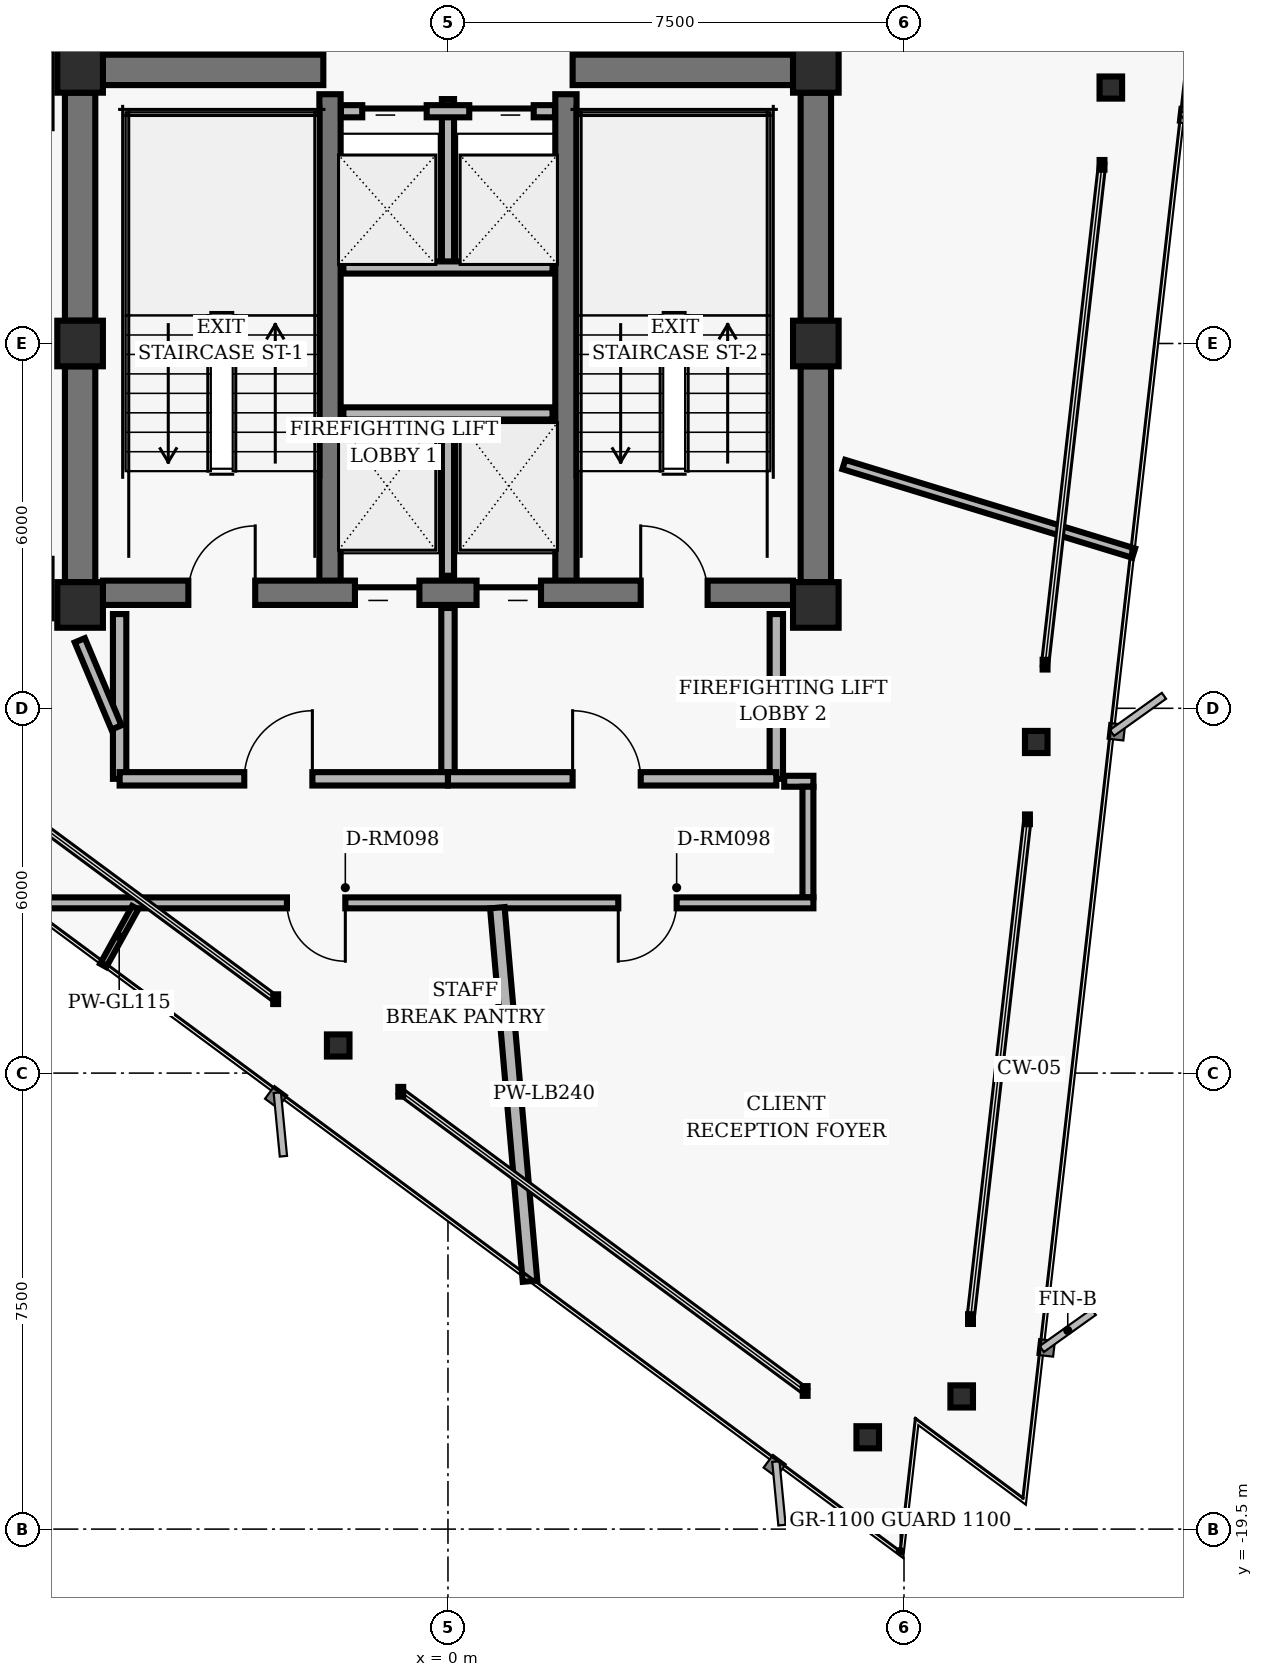
"""IFC4 building model, lengths in metres.
Left out: names, types, materials, properties, quantities, classifications, styles, units other than length and angle.
Written with IfcOpenShell. Run it as: python <this file> out.ifc"""

import sys

from ifc_helpers import new_model, si_unit, direction, frame, frame_2d, origin, origin_2d, place, context, subcontext, project, spatial, rectangle, hollow_rectangle, i_section, extrude, element, fill, save


model = new_model("IFC4")
c1 = context("Model", 3, precision=1e-05, world=origin(), true_north=direction((0.0, 1.0)))
c2 = subcontext(c1, "Body", "Model", "MODEL_VIEW")
j1 = project(units=[si_unit("LENGTHUNIT", "METRE"), si_unit("PLANEANGLEUNIT", "RADIAN")], contexts=[c1])
p1 = place(None, origin())
s1 = spatial("IfcSite", under=j1, at=p1, CompositionType="ELEMENT")
p2 = place(p1, origin())
s2 = spatial("IfcBuilding", under=s1, at=p2, CompositionType="ELEMENT")
p3 = place(p2, frame((0.0, 0.0, 230.08)))
s3 = spatial("IfcBuildingStorey", under=s2, at=p3, CompositionType="ELEMENT", Elevation=230.08)
for number, where, z_axis, x_axis in (
    (1, (-6.05, 4.5, 0.0), (0.0, 0.0, 1.0), (1.0, 0.0, 0.0)),
    (2, (6.05, 4.5, 0.0), (0.0, 0.0, 1.0), (1.0, 0.0, 0.0)),
    (3, (-6.05, 0.0, 0.0), (0.0, 0.0, 1.0), (1.0, 0.0, 0.0)),
    (4, (6.05, 0.0, 0.0), (0.0, 0.0, 1.0), (1.0, 0.0, 0.0)),
    (5, (-6.05, -4.3, 0.0), (0.0, 0.0, 1.0), (1.0, 0.0, 0.0)),
    (6, (6.05, -4.3, 0.0), (0.0, 0.0, 1.0), (1.0, 0.0, 0.0)),
):
    element("IfcColumn", number, at=place(p3, frame(where, z_axis=z_axis, x_axis=x_axis)), inside=s3, PredefinedType="COLUMN", context=c2, shape_type="SweptSolid", body=[
        extrude(hollow_rectangle(XDim=0.75, YDim=0.75, WallThickness=0.05, InnerFilletRadius=0.02, OuterFilletRadius=0.04, at=origin_2d()), origin(), (0.0, 0.0, 1.0), 3.04),
    ])
p4 = place(p3, frame((-6.05, 0.375, 0.0), z_axis=(0.0, 0.0, 1.0), x_axis=(0.0, 1.0, 0.0)))
e7 = element("IfcWall", 7, at=p4, inside=s3, PredefinedType="SHEAR", context=c2, shape_type="SweptSolid", body=[
    extrude(rectangle(XDim=3.75, YDim=0.5, at=frame_2d((1.875, 0.0))), origin(), (0.0, 0.0, 1.0), 2.798),
])
p5 = place(p3, frame((-6.05, -3.925, 0.0), z_axis=(0.0, 0.0, 1.0), x_axis=(0.0, 1.0, 0.0)))
e8 = element("IfcWall", 8, at=p5, inside=s3, PredefinedType="SHEAR", context=c2, shape_type="SweptSolid", body=[
    extrude(rectangle(XDim=3.55, YDim=0.5, at=frame_2d((1.775, 0.0))), origin(), (0.0, 0.0, 1.0), 2.798),
])
p6 = place(p3, frame((6.05, 0.375, 0.0), z_axis=(0.0, 0.0, 1.0), x_axis=(0.0, 1.0, 0.0)))
e9 = element("IfcWall", 9, at=p6, inside=s3, PredefinedType="SHEAR", context=c2, shape_type="SweptSolid", body=[
    extrude(rectangle(XDim=3.75, YDim=0.5, at=frame_2d((1.875, 0.0))), origin(), (0.0, 0.0, 1.0), 2.798),
])
p7 = place(p3, frame((6.05, -3.925, 0.0), z_axis=(0.0, 0.0, 1.0), x_axis=(0.0, 1.0, 0.0)))
e10 = element("IfcWall", 10, at=p7, inside=s3, PredefinedType="SHEAR", context=c2, shape_type="SweptSolid", body=[
    extrude(rectangle(XDim=3.55, YDim=0.5, at=frame_2d((1.775, 0.0))), origin(), (0.0, 0.0, 1.0), 2.798),
])
for number, where, z_axis, x_axis in (
    (11, (-1.94, -4.1, 0.0), (0.0, 0.0, 1.0), (0.0, 1.0, 0.0)),
    (12, (1.94, -4.1, 0.0), (0.0, 0.0, 1.0), (0.0, 1.0, 0.0)),
):
    element("IfcWall", number, at=place(p3, frame(where, z_axis=z_axis, x_axis=x_axis)), inside=s3, PredefinedType="SHEAR", context=c2, shape_type="SweptSolid", body=[
        extrude(rectangle(XDim=8.2, YDim=0.35, at=frame_2d((4.1, 0.0))), origin(), (0.0, 0.0, 1.0), 2.798),
    ])
p8 = place(p3, frame((-5.675, -4.1, 0.0), z_axis=(0.0, 0.0, 1.0), x_axis=(1.0, 0.0, 0.0)))
e13 = element("IfcWall", 13, at=p8, inside=s3, PredefinedType="SHEAR", context=c2, shape_type="SweptSolid", body=[
    extrude(rectangle(XDim=11.35, YDim=0.4, at=frame_2d((5.675, 0.0))), origin(), (0.0, 0.0, 1.0), 2.798),
])
p9 = place(p8, frame((1.405, 0.0, 0.0)))
e14 = element("IfcOpeningElement", 14, at=p9, cuts=e13, PredefinedType="OPENING", context=c2, shape_type="SweptSolid", body=[
    extrude(rectangle(XDim=1.1, YDim=2.04, at=frame_2d((0.55, 1.02))), frame((0.0, 0.21, 0.0), z_axis=(0.0, -1.0, 0.0), x_axis=(1.0, 0.0, 0.0)), (0.0, 0.0, 1.0), 0.42),
])
p10 = place(p8, frame((8.845, 0.0, 0.0)))
e15 = element("IfcOpeningElement", 15, at=p10, cuts=e13, PredefinedType="OPENING", context=c2, shape_type="SweptSolid", body=[
    extrude(rectangle(XDim=1.1, YDim=2.04, at=frame_2d((0.55, 1.02))), frame((0.0, 0.21, 0.0), z_axis=(0.0, -1.0, 0.0), x_axis=(1.0, 0.0, 0.0)), (0.0, 0.0, 1.0), 0.42),
])
p11 = place(p8, frame((4.145, 0.0, 0.0)))
e16 = element("IfcOpeningElement", 16, at=p11, cuts=e13, PredefinedType="OPENING", context=c2, shape_type="SweptSolid", body=[
    extrude(rectangle(XDim=1.06, YDim=2.04, at=frame_2d((0.53, 1.02))), frame((0.0, 0.21, 0.0), z_axis=(0.0, -1.0, 0.0), x_axis=(1.0, 0.0, 0.0)), (0.0, 0.0, 1.0), 0.42),
])
p12 = place(p8, frame((6.145, 0.0, 0.0)))
e17 = element("IfcOpeningElement", 17, at=p12, cuts=e13, PredefinedType="OPENING", context=c2, shape_type="SweptSolid", body=[
    extrude(rectangle(XDim=1.06, YDim=2.04, at=frame_2d((0.53, 1.02))), frame((0.0, 0.21, 0.0), z_axis=(0.0, -1.0, 0.0), x_axis=(1.0, 0.0, 0.0)), (0.0, 0.0, 1.0), 0.42),
])
for number, where, z_axis, x_axis in (
    (18, (-5.675, 4.5, 0.0), (0.0, 0.0, 1.0), (1.0, 0.0, 0.0)),
    (19, (2.05, 4.5, 0.0), (0.0, 0.0, 1.0), (1.0, 0.0, 0.0)),
):
    element("IfcWall", number, at=place(p3, frame(where, z_axis=z_axis, x_axis=x_axis)), inside=s3, PredefinedType="SHEAR", context=c2, shape_type="SweptSolid", body=[
        extrude(rectangle(XDim=3.625, YDim=0.5, at=frame_2d((1.812, 0.0))), origin(), (0.0, 0.0, 1.0), 2.798),
    ])
for number, where, z_axis, x_axis in (
    (20, (8.448, -17.318, 0.0), (0.0, 0.0, 1.0), (1.0, 0.0, 0.0)),
    (21, (9.675, -6.554, 0.0), (0.0, 0.0, 1.0), (1.0, 0.0, 0.0)),
    (22, (10.901, 4.21, 0.0), (0.0, 0.0, 1.0), (1.0, 0.0, 0.0)),
    (23, (-1.805, -11.546, 0.0), (0.0, 0.0, 1.0), (1.0, 0.0, 0.0)),
    (24, (6.903, -17.99, 0.0), (0.0, 0.0, 1.0), (1.0, 0.0, 0.0)),
):
    element("IfcColumn", number, at=place(p3, frame(where, z_axis=z_axis, x_axis=x_axis)), inside=s3, PredefinedType="COLUMN", context=c2, shape_type="SweptSolid", body=[
        extrude(i_section(OverallWidth=0.371, OverallDepth=0.364, WebThickness=0.013, FlangeThickness=0.022, FilletRadius=0.015, at=origin_2d()), origin(), (0.0, 0.0, 1.0), 3.04),
    ])
p13 = place(p3, frame((0.0, -3.82, 0.0), z_axis=(0.0, 0.0, 1.0), x_axis=(0.0, 1.0, 0.0)))
e25 = element("IfcWall", 25, at=p13, inside=s3, PredefinedType="PARTITIONING", context=c2, shape_type="SweptSolid", body=[
    extrude(rectangle(XDim=2.67, YDim=0.2, at=frame_2d((1.335, 0.0))), origin(), (0.0, 0.0, 1.0), 2.773),
])
p14 = place(p3, frame((-1.72, -1.15, 0.0), z_axis=(0.0, 0.0, 1.0), x_axis=(1.0, 0.0, 0.0)))
e26 = element("IfcWall", 26, at=p14, inside=s3, PredefinedType="PARTITIONING", context=c2, shape_type="SweptSolid", body=[
    extrude(rectangle(XDim=3.44, YDim=0.2, at=frame_2d((1.72, 0.0))), origin(), (0.0, 0.0, 1.0), 2.773),
])
for number, where, z_axis, x_axis in (
    (27, (-5.4, -7.16, 0.0), (0.0, 0.0, 1.0), (0.0, 1.0, 0.0)),
    (28, (5.4, -7.16, 0.0), (0.0, 0.0, 1.0), (0.0, 1.0, 0.0)),
):
    element("IfcWall", number, at=place(p3, frame(where, z_axis=z_axis, x_axis=x_axis)), inside=s3, PredefinedType="PARTITIONING", context=c2, shape_type="SweptSolid", body=[
        extrude(rectangle(XDim=2.71, YDim=0.22, at=frame_2d((1.355, 0.0))), origin(), (0.0, 0.0, 1.0), 2.773),
    ])
p15 = place(p3, frame((0.0, -7.16, 0.0), z_axis=(0.0, 0.0, 1.0), x_axis=(0.0, 1.0, 0.0)))
e29 = element("IfcWall", 29, at=p15, inside=s3, PredefinedType="PARTITIONING", context=c2, shape_type="SweptSolid", body=[
    extrude(rectangle(XDim=2.81, YDim=0.22, at=frame_2d((1.405, 0.0))), origin(), (0.0, 0.0, 1.0), 2.773),
])
p16 = place(p3, frame((-5.4, -7.16, 0.0), z_axis=(0.0, 0.0, 1.0), x_axis=(1.0, 0.0, 0.0)))
e30 = element("IfcWall", 30, at=p16, inside=s3, PredefinedType="PARTITIONING", context=c2, shape_type="SweptSolid", body=[
    extrude(rectangle(XDim=5.4, YDim=0.22, at=frame_2d((2.7, 0.0))), origin(), (0.0, 0.0, 1.0), 2.395),
])
p17 = place(p16, frame((2.05, 0.0, 0.0)))
e31 = element("IfcOpeningElement", 31, at=p17, cuts=e30, PredefinedType="OPENING", context=c2, shape_type="SweptSolid", body=[
    extrude(rectangle(XDim=1.12, YDim=2.02, at=frame_2d((0.56, 1.01))), frame((0.0, 0.12, 0.0), z_axis=(0.0, -1.0, 0.0), x_axis=(1.0, 0.0, 0.0)), (0.0, 0.0, 1.0), 0.24),
])
p18 = place(p3, frame((0.0, -7.16, 0.0), z_axis=(0.0, 0.0, 1.0), x_axis=(1.0, 0.0, 0.0)))
e32 = element("IfcWall", 32, at=p18, inside=s3, PredefinedType="PARTITIONING", context=c2, shape_type="SweptSolid", body=[
    extrude(rectangle(XDim=5.4, YDim=0.22, at=frame_2d((2.7, 0.0))), origin(), (0.0, 0.0, 1.0), 2.773),
])
p19 = place(p18, frame((2.05, 0.0, 0.0)))
e33 = element("IfcOpeningElement", 33, at=p19, cuts=e32, PredefinedType="OPENING", context=c2, shape_type="SweptSolid", body=[
    extrude(rectangle(XDim=1.12, YDim=2.02, at=frame_2d((0.56, 1.01))), frame((0.0, 0.12, 0.0), z_axis=(0.0, -1.0, 0.0), x_axis=(1.0, 0.0, 0.0)), (0.0, 0.0, 1.0), 0.24),
])
p20 = place(p3, frame((0.0, 1.25, 0.0), z_axis=(0.0, 0.0, 1.0), x_axis=(0.0, 1.0, 0.0)))
e34 = element("IfcWall", 34, at=p20, inside=s3, PredefinedType="PARTITIONING", context=c2, shape_type="SweptSolid", body=[
    extrude(rectangle(XDim=2.77, YDim=0.2, at=frame_2d((1.385, 0.0))), origin(), (0.0, 0.0, 1.0), 2.773),
])
p21 = place(p3, frame((-1.72, 1.25, 0.0), z_axis=(0.0, 0.0, 1.0), x_axis=(1.0, 0.0, 0.0)))
e35 = element("IfcWall", 35, at=p21, inside=s3, PredefinedType="PARTITIONING", context=c2, shape_type="SweptSolid", body=[
    extrude(rectangle(XDim=3.44, YDim=0.2, at=frame_2d((1.72, 0.0))), origin(), (0.0, 0.0, 1.0), 2.773),
])
p22 = place(p3, frame((-1.76, 3.82, 0.0), z_axis=(0.0, 0.0, 1.0), x_axis=(1.0, 0.0, 0.0)))
e36 = element("IfcWall", 36, at=p22, inside=s3, PredefinedType="PARTITIONING", context=c2, shape_type="SweptSolid", body=[
    extrude(rectangle(XDim=3.52, YDim=0.2, at=frame_2d((1.76, 0.0))), origin(), (0.0, 0.0, 1.0), 2.773),
])
p23 = place(p22, frame((0.35, 0.0, 0.0)))
e37 = element("IfcOpeningElement", 37, at=p23, cuts=e36, PredefinedType="OPENING", context=c2, shape_type="SweptSolid", body=[
    extrude(rectangle(XDim=1.06, YDim=2.04, at=frame_2d((0.53, 1.02))), frame((0.0, 0.11, 0.0), z_axis=(0.0, -1.0, 0.0), x_axis=(1.0, 0.0, 0.0)), (0.0, 0.0, 1.0), 0.22),
])
p24 = place(p22, frame((2.11, 0.0, 0.0)))
e38 = element("IfcOpeningElement", 38, at=p24, cuts=e36, PredefinedType="OPENING", context=c2, shape_type="SweptSolid", body=[
    extrude(rectangle(XDim=1.06, YDim=2.04, at=frame_2d((0.53, 1.02))), frame((0.0, 0.11, 0.0), z_axis=(0.0, -1.0, 0.0), x_axis=(1.0, 0.0, 0.0)), (0.0, 0.0, 1.0), 0.22),
])
p25 = place(p3, frame((-6.055, -4.882, 0.0), z_axis=(0.0, 0.0, 1.0), x_axis=(0.387579540458, -0.921836265189, 0.0)))
e39 = element("IfcWall", 39, at=p25, inside=s3, PredefinedType="PARTITIONING", context=c2, shape_type="SweptSolid", body=[
    extrude(rectangle(XDim=1.555, YDim=0.18, at=frame_2d((0.777, 0.0))), origin(), (0.0, 0.0, 1.0), 2.253),
])
p26 = place(p3, frame((5.53, -7.2, 0.0), z_axis=(0.0, 0.0, 1.0), x_axis=(1.0, 0.0, 0.0)))
e40 = element("IfcWall", 40, at=p26, inside=s3, PredefinedType="PARTITIONING", context=c2, shape_type="SweptSolid", body=[
    extrude(rectangle(XDim=0.48, YDim=0.18, at=frame_2d((0.24, 0.0))), origin(), (0.0, 0.0, 1.0), 2.773),
])
p27 = place(p3, frame((5.92, -7.29, 0.0), z_axis=(0.0, 0.0, 1.0), x_axis=(0.0, -1.0, 0.0)))
e41 = element("IfcWall", 41, at=p27, inside=s3, PredefinedType="PARTITIONING", context=c2, shape_type="SweptSolid", body=[
    extrude(rectangle(XDim=1.82, YDim=0.18, at=frame_2d((0.91, 0.0))), origin(), (0.0, 0.0, 1.0), 2.253),
])
p28 = place(p3, frame((6.01, -9.2, 0.0), z_axis=(0.0, 0.0, 1.0), x_axis=(-1.0, 0.0, 0.0)))
e42 = element("IfcWall", 42, at=p28, inside=s3, PredefinedType="PARTITIONING", context=c2, shape_type="SweptSolid", body=[
    extrude(rectangle(XDim=12.84, YDim=0.18, at=frame_2d((6.42, 0.0))), origin(), (0.0, 0.0, 1.0), 2.773),
])
p29 = place(p28, frame((7.698, 0.0, 0.0)))
e43 = element("IfcOpeningElement", 43, at=p29, cuts=e42, PredefinedType="OPENING", context=c2, shape_type="SweptSolid", body=[
    extrude(rectangle(XDim=0.96, YDim=2.02, at=frame_2d((0.48, 1.01))), frame((0.0, 0.1, 0.0), z_axis=(0.0, -1.0, 0.0), x_axis=(1.0, 0.0, 0.0)), (0.0, 0.0, 1.0), 0.2),
])
p30 = place(p28, frame((2.249, 0.0, 0.0)))
e44 = element("IfcOpeningElement", 44, at=p30, cuts=e42, PredefinedType="OPENING", context=c2, shape_type="SweptSolid", body=[
    extrude(rectangle(XDim=0.96, YDim=2.02, at=frame_2d((0.48, 1.01))), frame((0.0, 0.1, 0.0), z_axis=(0.0, -1.0, 0.0), x_axis=(1.0, 0.0, 0.0)), (0.0, 0.0, 1.0), 0.2),
])
p31 = place(p3, frame((-5.144, -9.28, 0.0), z_axis=(0.0, 0.0, 1.0), x_axis=(-0.484725114425, -0.874666544144, 0.0)))
e45 = element("IfcWall", 45, at=p31, inside=s3, PredefinedType="MOVABLE", context=c2, shape_type="SweptSolid", body=[
    extrude(rectangle(XDim=1.084, YDim=0.115, at=frame_2d((0.542, 0.0))), origin(), (0.0, 0.0, 1.0), 2.773),
])
p32 = place(p3, frame((0.812, -9.28, 0.0), z_axis=(0.0, 0.0, 1.0), x_axis=(0.087150741032, -0.996195135673, 0.0)))
e46 = element("IfcWall", 46, at=p32, inside=s3, PredefinedType="PARTITIONING", context=c2, shape_type="SweptSolid", body=[
    extrude(rectangle(XDim=6.166, YDim=0.24, at=frame_2d((3.083, 0.0))), origin(), (0.0, 0.0, 1.0), 2.773),
])
p33 = place(p3, frame((6.51, -1.99, 0.0), z_axis=(0.0, 0.0, 1.0), x_axis=(0.956296423481, -0.292398957653, 0.0)))
e47 = element("IfcWall", 47, at=p33, inside=s3, PredefinedType="PARTITIONING", context=c2, shape_type="SweptSolid", body=[
    extrude(rectangle(XDim=4.985, YDim=0.16, at=frame_2d((2.492, 0.0))), origin(), (0.0, 0.0, 1.0), 2.773),
])
p34 = place(p9, origin())
e48 = element("IfcDoor", 48, at=p34, inside=s3, OperationType="SINGLE_SWING_RIGHT", PredefinedType="DOOR", context=c2, shape_type="SweptSolid", body=[
    extrude(rectangle(XDim=1.1, YDim=2.04, at=frame_2d((0.55, 1.02))), frame((0.0, 0.025, 0.0), z_axis=(0.0, -1.0, 0.0), x_axis=(1.0, 0.0, 0.0)), (0.0, 0.0, 1.0), 0.05),
])
fill(e14, e48)
p35 = place(p10, origin())
e49 = element("IfcDoor", 49, at=p35, inside=s3, OperationType="SINGLE_SWING_LEFT", PredefinedType="DOOR", context=c2, shape_type="SweptSolid", body=[
    extrude(rectangle(XDim=1.1, YDim=2.04, at=frame_2d((0.55, 1.02))), frame((0.0, 0.025, 0.0), z_axis=(0.0, -1.0, 0.0), x_axis=(1.0, 0.0, 0.0)), (0.0, 0.0, 1.0), 0.05),
])
fill(e15, e49)
p36 = place(p11, origin())
e50 = element("IfcDoor", 50, at=p36, inside=s3, OperationType="SLIDING_TO_LEFT", PredefinedType="DOOR", context=c2, shape_type="SweptSolid", body=[
    extrude(rectangle(XDim=1.06, YDim=2.04, at=frame_2d((0.53, 1.02))), frame((0.0, 0.025, 0.0), z_axis=(0.0, -1.0, 0.0), x_axis=(1.0, 0.0, 0.0)), (0.0, 0.0, 1.0), 0.05),
])
fill(e16, e50)
p37 = place(p12, origin())
e51 = element("IfcDoor", 51, at=p37, inside=s3, OperationType="SLIDING_TO_RIGHT", PredefinedType="DOOR", context=c2, shape_type="SweptSolid", body=[
    extrude(rectangle(XDim=1.06, YDim=2.04, at=frame_2d((0.53, 1.02))), frame((0.0, 0.025, 0.0), z_axis=(0.0, -1.0, 0.0), x_axis=(1.0, 0.0, 0.0)), (0.0, 0.0, 1.0), 0.05),
])
fill(e17, e51)
p38 = place(p17, origin())
e52 = element("IfcDoor", 52, at=p38, inside=s3, OperationType="SINGLE_SWING_RIGHT", PredefinedType="DOOR", context=c2, shape_type="SweptSolid", body=[
    extrude(rectangle(XDim=1.12, YDim=2.02, at=frame_2d((0.56, 1.01))), frame((0.0, 0.025, 0.0), z_axis=(0.0, -1.0, 0.0), x_axis=(1.0, 0.0, 0.0)), (0.0, 0.0, 1.0), 0.05),
])
fill(e31, e52)
p39 = place(p19, origin())
e53 = element("IfcDoor", 53, at=p39, inside=s3, OperationType="SINGLE_SWING_LEFT", PredefinedType="DOOR", context=c2, shape_type="SweptSolid", body=[
    extrude(rectangle(XDim=1.12, YDim=2.02, at=frame_2d((0.56, 1.01))), frame((0.0, 0.025, 0.0), z_axis=(0.0, -1.0, 0.0), x_axis=(1.0, 0.0, 0.0)), (0.0, 0.0, 1.0), 0.05),
])
fill(e33, e53)
p40 = place(p23, origin())
e54 = element("IfcDoor", 54, at=p40, inside=s3, OperationType="SLIDING_TO_LEFT", PredefinedType="DOOR", context=c2, shape_type="SweptSolid", body=[
    extrude(rectangle(XDim=1.06, YDim=2.04, at=frame_2d((0.53, 1.02))), frame((0.0, 0.025, 0.0), z_axis=(0.0, -1.0, 0.0), x_axis=(1.0, 0.0, 0.0)), (0.0, 0.0, 1.0), 0.05),
])
fill(e37, e54)
p41 = place(p24, origin())
e55 = element("IfcDoor", 55, at=p41, inside=s3, OperationType="SLIDING_TO_RIGHT", PredefinedType="DOOR", context=c2, shape_type="SweptSolid", body=[
    extrude(rectangle(XDim=1.06, YDim=2.04, at=frame_2d((0.53, 1.02))), frame((0.0, 0.025, 0.0), z_axis=(0.0, -1.0, 0.0), x_axis=(1.0, 0.0, 0.0)), (0.0, 0.0, 1.0), 0.05),
])
fill(e38, e55)
p42 = place(p29, origin())
e56 = element("IfcDoor", 56, at=p42, inside=s3, OperationType="SINGLE_SWING_LEFT", PredefinedType="DOOR", context=c2, shape_type="SweptSolid", body=[
    extrude(rectangle(XDim=0.96, YDim=2.02, at=frame_2d((0.48, 1.01))), frame((0.0, 0.025, 0.0), z_axis=(0.0, -1.0, 0.0), x_axis=(1.0, 0.0, 0.0)), (0.0, 0.0, 1.0), 0.05),
])
fill(e43, e56)
p43 = place(p30, origin())
e57 = element("IfcDoor", 57, at=p43, inside=s3, OperationType="SINGLE_SWING_RIGHT", PredefinedType="DOOR", context=c2, shape_type="SweptSolid", body=[
    extrude(rectangle(XDim=0.96, YDim=2.02, at=frame_2d((0.48, 1.01))), frame((0.0, 0.025, 0.0), z_axis=(0.0, -1.0, 0.0), x_axis=(1.0, 0.0, 0.0)), (0.0, 0.0, 1.0), 0.05),
])
fill(e44, e57)
save(model, sys.argv[1])
